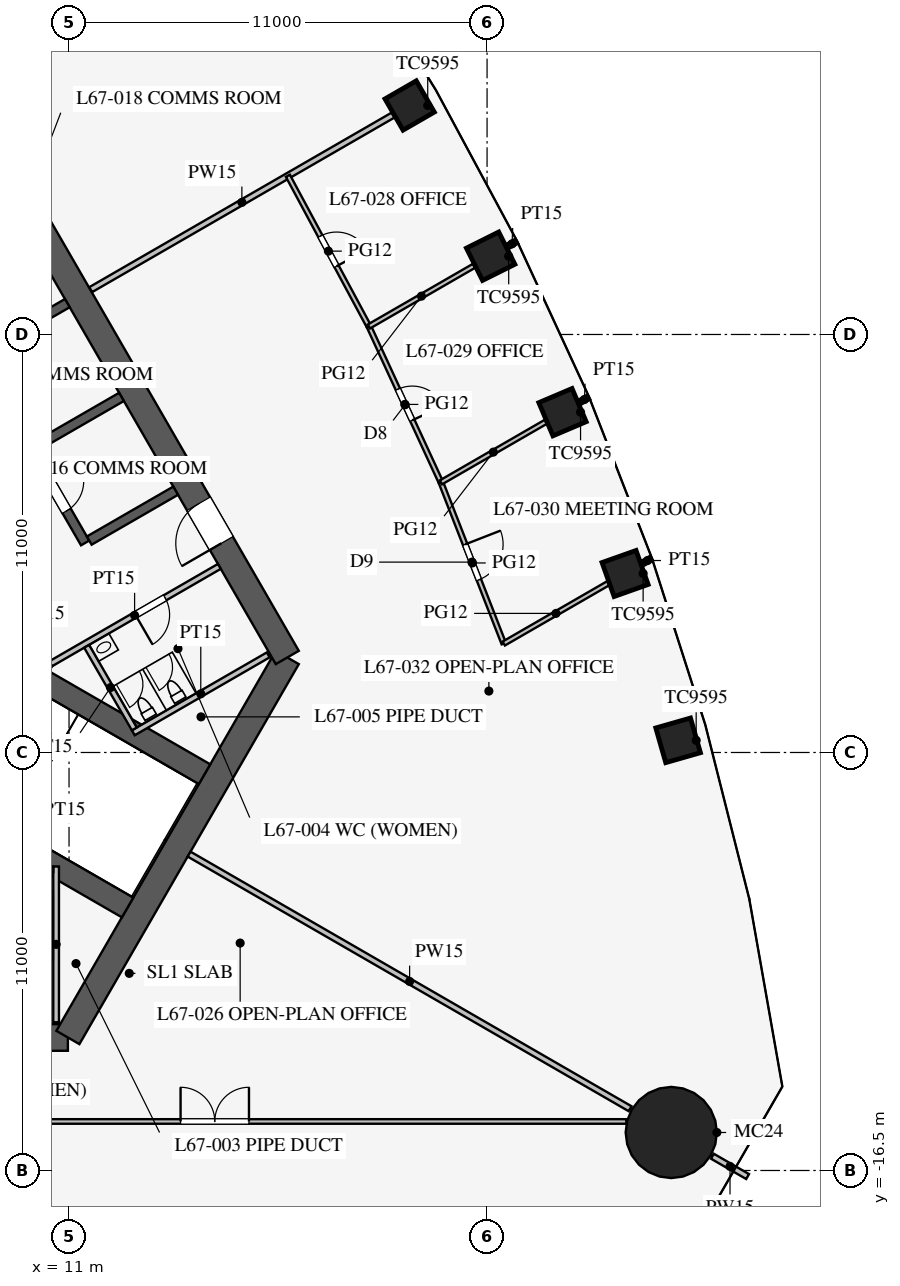
"""IFC4 building model, lengths in metres.
Left out: names, types, materials, properties, quantities, classifications, styles, units other than length and angle.
Written with IfcOpenShell. Run it as: python <this file> out.ifc"""

import sys

from ifc_helpers import new_model, si_unit, direction, frame, frame_2d, origin, origin_2d, place, context, subcontext, project, spatial, rectangle, circle, extrude, element, fill, save


model = new_model("IFC4")
c1 = context("Model", 3, precision=1e-05, world=origin(), true_north=direction((0.0, 1.0)))
c2 = subcontext(c1, "Body", "Model", "MODEL_VIEW")
j1 = project(units=[si_unit("LENGTHUNIT", "METRE"), si_unit("PLANEANGLEUNIT", "RADIAN")], contexts=[c1])
p1 = place(None, origin())
s1 = spatial("IfcSite", under=j1, at=p1, CompositionType="ELEMENT")
p2 = place(p1, origin())
s2 = spatial("IfcBuilding", under=s1, at=p2, CompositionType="ELEMENT")
p3 = place(p2, frame((0.0, 0.0, 293.1)))
s3 = spatial("IfcBuildingStorey", under=s2, at=p3, CompositionType="ELEMENT", Elevation=293.1)
for number, where, z_axis, x_axis in (
    (1, (27.027, -5.18, 0.0), (0.0, 0.0, 1.0), (-0.275, 0.961, 0.0)),
    (2, (25.632, -0.79, 0.0), (0.0, 0.0, 1.0), (-0.334, 0.942, 0.0)),
    (3, (23.985, 3.455, 0.0), (0.0, 0.0, 1.0), (-0.391, 0.92, 0.0)),
    (4, (22.094, 7.56, 0.0), (0.0, 0.0, 1.0), (-0.447, 0.895, 0.0)),
    (5, (19.963, 11.526, 0.0), (0.0, 0.0, 1.0), (-0.5, 0.866, 0.0)),
):
    element("IfcColumn", number, at=place(p3, frame(where, z_axis=z_axis, x_axis=x_axis)), inside=s3, PredefinedType="COLUMN", context=c2, shape_type="SweptSolid", body=[
        extrude(rectangle(XDim=0.95, YDim=0.95, at=origin_2d()), origin(), (0.0, 0.0, 1.0), 4.2),
    ])
p4 = place(p3, frame((26.847, -15.5, 0.0), z_axis=(0.0, 0.0, 1.0), x_axis=(1.0, 0.0, 0.0)))
e6 = element("IfcColumn", 6, at=p4, inside=s3, PredefinedType="COLUMN", context=c2, shape_type="SweptSolid", body=[
    extrude(circle(Radius=1.2, at=origin_2d()), origin(), (0.0, 0.0, 1.0), 4.2),
])
p5 = place(p3, frame((-10.97, -13.0, 0.0), z_axis=(0.0, 0.0, 1.0), x_axis=(1.0, 0.0, 0.0)))
e7 = element("IfcWall", 7, at=p5, inside=s3, PredefinedType="SHEAR", context=c2, shape_type="SweptSolid", body=[
    extrude(rectangle(XDim=21.939, YDim=0.7, at=frame_2d((10.97, 0.0))), origin(), (0.0, 0.0, 1.0), 4.2),
])
p6 = place(p5, frame((17.27, 0.0, 0.0)))
e8 = element("IfcOpeningElement", 8, at=p6, cuts=e7, PredefinedType="OPENING", context=c2, shape_type="SweptSolid", body=[
    extrude(rectangle(XDim=1.2, YDim=2.1, at=frame_2d((0.6, 1.05))), frame((0.0, 0.36, 0.0), z_axis=(0.0, -1.0, 0.0), x_axis=(1.0, 0.0, 0.0)), (0.0, 0.0, 1.0), 0.72),
])
p7 = place(p5, frame((3.47, 0.0, 0.0)))
e9 = element("IfcOpeningElement", 9, at=p7, cuts=e7, PredefinedType="OPENING", context=c2, shape_type="SweptSolid", body=[
    extrude(rectangle(XDim=1.2, YDim=2.1, at=frame_2d((0.6, 1.05))), frame((0.0, 0.36, 0.0), z_axis=(0.0, -1.0, 0.0), x_axis=(1.0, 0.0, 0.0)), (0.0, 0.0, 1.0), 0.72),
])
p8 = place(p3, frame((10.97, -13.0, 0.0), z_axis=(0.0, 0.0, 1.0), x_axis=(0.499995765644, 0.866027848477, 0.0)))
e10 = element("IfcWall", 10, at=p8, inside=s3, PredefinedType="SHEAR", context=c2, shape_type="SweptSolid", body=[
    extrude(rectangle(XDim=11.547, YDim=0.7, at=frame_2d((5.773, 0.0))), origin(), (0.0, 0.0, 1.0), 4.2),
])
p9 = place(p3, frame((16.743, -3.0, 0.0), z_axis=(0.0, 0.0, 1.0), x_axis=(-0.500002442456, 0.866023993627, 0.0)))
e11 = element("IfcWall", 11, at=p9, inside=s3, PredefinedType="SHEAR", context=c2, shape_type="SweptSolid", body=[
    extrude(rectangle(XDim=21.939, YDim=0.7, at=frame_2d((10.97, 0.0))), origin(), (0.0, 0.0, 1.0), 4.2),
])
p10 = place(p9, frame((17.27, 0.0, 0.0)))
e12 = element("IfcOpeningElement", 12, at=p10, cuts=e11, PredefinedType="OPENING", context=c2, shape_type="SweptSolid", body=[
    extrude(rectangle(XDim=1.2, YDim=2.1, at=frame_2d((0.6, 1.05))), frame((0.0, 0.36, 0.0), z_axis=(0.0, -1.0, 0.0), x_axis=(1.0, 0.0, 0.0)), (0.0, 0.0, 1.0), 0.72),
])
p11 = place(p9, frame((3.47, 0.0, 0.0)))
e13 = element("IfcOpeningElement", 13, at=p11, cuts=e11, PredefinedType="OPENING", context=c2, shape_type="SweptSolid", body=[
    extrude(rectangle(XDim=1.2, YDim=2.1, at=frame_2d((0.6, 1.05))), frame((0.0, 0.36, 0.0), z_axis=(0.0, -1.0, 0.0), x_axis=(1.0, 0.0, 0.0)), (0.0, 0.0, 1.0), 0.72),
])
p12 = place(p3, frame((11.424, 0.014, 0.0), z_axis=(0.0, 0.0, 1.0), x_axis=(-0.500001763848, 0.866024385424, 0.0)))
e14 = element("IfcWall", 14, at=p12, inside=s3, PredefinedType="SHEAR", context=c2, shape_type="SweptSolid", body=[
    extrude(rectangle(XDim=11.4, YDim=0.25, at=frame_2d((5.7, 0.0))), origin(), (0.0, 0.0, 1.0), 4.2),
])
p13 = place(p12, frame((0.975, 0.0, 0.0)))
e15 = element("IfcOpeningElement", 15, at=p13, cuts=e14, PredefinedType="OPENING", context=c2, shape_type="SweptSolid", body=[
    extrude(rectangle(XDim=0.9, YDim=2.1, at=frame_2d((0.45, 1.05))), frame((0.0, 0.135, 0.0), z_axis=(0.0, -1.0, 0.0), x_axis=(1.0, 0.0, 0.0)), (0.0, 0.0, 1.0), 0.27),
])
p14 = place(p12, frame((3.825, 0.0, 0.0)))
e16 = element("IfcOpeningElement", 16, at=p14, cuts=e14, PredefinedType="OPENING", context=c2, shape_type="SweptSolid", body=[
    extrude(rectangle(XDim=0.9, YDim=2.1, at=frame_2d((0.45, 1.05))), frame((0.0, 0.135, 0.0), z_axis=(0.0, -1.0, 0.0), x_axis=(1.0, 0.0, 0.0)), (0.0, 0.0, 1.0), 0.27),
])
p15 = place(p12, frame((6.675, 0.0, 0.0)))
e17 = element("IfcOpeningElement", 17, at=p15, cuts=e14, PredefinedType="OPENING", context=c2, shape_type="SweptSolid", body=[
    extrude(rectangle(XDim=0.9, YDim=2.1, at=frame_2d((0.45, 1.05))), frame((0.0, 0.135, 0.0), z_axis=(0.0, -1.0, 0.0), x_axis=(1.0, 0.0, 0.0)), (0.0, 0.0, 1.0), 0.27),
])
p16 = place(p12, frame((9.525, 0.0, 0.0)))
e18 = element("IfcOpeningElement", 18, at=p16, cuts=e14, PredefinedType="OPENING", context=c2, shape_type="SweptSolid", body=[
    extrude(rectangle(XDim=0.9, YDim=2.1, at=frame_2d((0.45, 1.05))), frame((0.0, 0.135, 0.0), z_axis=(0.0, -1.0, 0.0), x_axis=(1.0, 0.0, 0.0)), (0.0, 0.0, 1.0), 0.27),
])
for number, where, z_axis, x_axis in (
    (19, (11.532, 0.076, 0.0), (0.0, 0.0, 1.0), (0.866, 0.5, 0.0)),
    (20, (10.107, 2.544, 0.0), (0.0, 0.0, 1.0), (0.866, 0.5, 0.0)),
    (21, (8.682, 5.012, 0.0), (0.0, 0.0, 1.0), (0.866, 0.5, 0.0)),
):
    element("IfcWall", number, at=place(p3, frame(where, z_axis=z_axis, x_axis=x_axis)), inside=s3, PredefinedType="SHEAR", context=c2, shape_type="SweptSolid", body=[
        extrude(rectangle(XDim=2.625, YDim=0.25, at=frame_2d((1.312, 0.0))), origin(), (0.0, 0.0, 1.0), 4.2),
    ])
for number, where, z_axis, x_axis in (
    (22, (4.638, -5.016, 0.0), (0.0, 0.0, 1.0), (0.866, -0.5, 0.0)),
    (23, (6.663, -1.509, 0.0), (0.0, 0.0, 1.0), (0.866, -0.5, 0.0)),
):
    element("IfcWall", number, at=place(p3, frame(where, z_axis=z_axis, x_axis=x_axis)), inside=s3, PredefinedType="SHEAR", context=c2, shape_type="SweptSolid", body=[
        extrude(rectangle(XDim=9.125, YDim=0.6, at=frame_2d((4.562, 0.0))), origin(), (0.0, 0.0, 1.0), 4.2),
    ])
p17 = place(p3, frame((10.495, -3.178, 0.0), z_axis=(0.0, 0.0, 1.0), x_axis=(0.866037967349, 0.499978238636, 0.0)))
e24 = element("IfcWall", 24, at=p17, inside=s3, PredefinedType="PARTITIONING", context=c2, shape_type="SweptSolid", body=[
    extrude(rectangle(XDim=5.15, YDim=0.15, at=frame_2d((2.575, 0.0))), origin(), (0.0, 0.0, 1.0), 4.0),
])
p18 = place(p17, frame((2.6, 0.0, 0.0)))
e25 = element("IfcOpeningElement", 25, at=p18, cuts=e24, PredefinedType="OPENING", context=c2, shape_type="SweptSolid", body=[
    extrude(rectangle(XDim=0.9, YDim=2.1, at=frame_2d((0.45, 1.05))), frame((0.0, 0.085, 0.0), z_axis=(0.0, -1.0, 0.0), x_axis=(1.0, 0.0, 0.0)), (0.0, 0.0, 1.0), 0.17),
])
p19 = place(p3, frame((10.66, -8.5, 0.0), z_axis=(0.0, 0.0, 1.0), x_axis=(0.0, -1.0, 0.0)))
e26 = element("IfcWall", 26, at=p19, inside=s3, PredefinedType="PARTITIONING", context=c2, shape_type="SweptSolid", body=[
    extrude(rectangle(XDim=4.1, YDim=0.15, at=frame_2d((2.05, 0.0))), origin(), (0.0, 0.0, 1.0), 4.0),
])
p20 = place(p3, frame((8.075, -8.575, 0.0), z_axis=(0.0, 0.0, 1.0), x_axis=(1.0, 0.0, 0.0)))
e27 = element("IfcWall", 27, at=p20, inside=s3, PredefinedType="PARTITIONING", context=c2, shape_type="SweptSolid", body=[
    extrude(rectangle(XDim=2.51, YDim=0.15, at=frame_2d((1.255, 0.0))), origin(), (0.0, 0.0, 1.0), 4.0),
])
p21 = place(p3, frame((12.691, -4.982, 0.0), z_axis=(0.0, 0.0, 1.0), x_axis=(0.8660249478, 0.500000789788, 0.0)))
e28 = element("IfcWall", 28, at=p21, inside=s3, PredefinedType="PARTITIONING", context=c2, shape_type="SweptSolid", body=[
    extrude(rectangle(XDim=4.1, YDim=0.15, at=frame_2d((2.05, 0.0))), origin(), (0.0, 0.0, 1.0), 4.0),
])
p22 = place(p3, frame((11.464, -2.706, 0.0), z_axis=(0.0, 0.0, 1.0), x_axis=(0.50001992892, -0.866013897511, 0.0)))
e29 = element("IfcWall", 29, at=p22, inside=s3, PredefinedType="PARTITIONING", context=c2, shape_type="SweptSolid", body=[
    extrude(rectangle(XDim=2.51, YDim=0.15, at=frame_2d((1.255, 0.0))), origin(), (0.0, 0.0, 1.0), 4.0),
])
p23 = place(p3, frame((14.159, -8.175, 0.0), z_axis=(0.0, 0.0, 1.0), x_axis=(0.866026905467, -0.499997399001, 0.0)))
e30 = element("IfcWall", 30, at=p23, inside=s3, PredefinedType="PARTITIONING", context=c2, shape_type="SweptSolid", body=[
    extrude(rectangle(XDim=13.4, YDim=0.15, at=frame_2d((6.7, 0.0))), origin(), (0.0, 0.0, 1.0), 2.5),
])
p24 = place(p3, frame((27.929, -16.125, 0.0), z_axis=(0.0, 0.0, 1.0), x_axis=(0.866086810508, -0.499893625349, 0.0)))
e31 = element("IfcWall", 31, at=p24, inside=s3, PredefinedType="PARTITIONING", context=c2, shape_type="SweptSolid", body=[
    extrude(rectangle(XDim=1.07, YDim=0.15, at=frame_2d((0.535, 0.0))), origin(), (0.0, 0.0, 1.0), 2.5),
])
p25 = place(p3, frame((-25.665, -15.21, 0.0), z_axis=(0.0, 0.0, 1.0), x_axis=(1.0, 0.0, 0.0)))
e32 = element("IfcWall", 32, at=p25, inside=s3, PredefinedType="PARTITIONING", context=c2, shape_type="SweptSolid", body=[
    extrude(rectangle(XDim=51.33, YDim=0.12, at=frame_2d((25.665, 0.0))), origin(), (0.0, 0.0, 1.0), 2.9),
])
p26 = place(p25, frame((9.9, 0.0, 0.15)))
e33 = element("IfcOpeningElement", 33, at=p26, cuts=e32, PredefinedType="OPENING", context=c2, shape_type="SweptSolid", body=[
    extrude(rectangle(XDim=1.8, YDim=2.1, at=frame_2d((0.9, 1.05))), frame((0.0, 0.07, 0.0), z_axis=(0.0, -1.0, 0.0), x_axis=(1.0, 0.0, 0.0)), (0.0, 0.0, 1.0), 0.14),
])
p27 = place(p25, frame((39.6, 0.0, 0.15)))
e34 = element("IfcOpeningElement", 34, at=p27, cuts=e32, PredefinedType="OPENING", context=c2, shape_type="SweptSolid", body=[
    extrude(rectangle(XDim=1.8, YDim=2.1, at=frame_2d((0.9, 1.05))), frame((0.0, 0.07, 0.0), z_axis=(0.0, -1.0, 0.0), x_axis=(1.0, 0.0, 0.0)), (0.0, 0.0, 1.0), 0.14),
])
p28 = place(p3, frame((11.57, 6.68, 0.0), z_axis=(0.0, 0.0, 1.0), x_axis=(0.866026706704, 0.49999774327, 0.0)))
e35 = element("IfcWall", 35, at=p28, inside=s3, PredefinedType="PARTITIONING", context=c2, shape_type="SweptSolid", body=[
    extrude(rectangle(XDim=9.187, YDim=0.15, at=frame_2d((4.593, 0.0))), origin(), (0.0, 0.0, 1.0), 3.3),
])
p29 = place(p3, frame((26.115, -0.511, 0.0), z_axis=(0.0, 0.0, 1.0), x_axis=(0.866201770413, 0.499694399542, 0.0)))
e36 = element("IfcWall", 36, at=p29, inside=s3, PredefinedType="PARTITIONING", context=c2, shape_type="SweptSolid", body=[
    extrude(rectangle(XDim=0.251, YDim=0.15, at=frame_2d((0.125, 0.0))), origin(), (0.0, 0.0, 1.0), 2.9),
])
p30 = place(p3, frame((22.533, 7.813, 0.0), z_axis=(0.0, 0.0, 1.0), x_axis=(0.866003030001, 0.500038750527, 0.0)))
e37 = element("IfcWall", 37, at=p30, inside=s3, PredefinedType="PARTITIONING", context=c2, shape_type="SweptSolid", body=[
    extrude(rectangle(XDim=0.29, YDim=0.15, at=frame_2d((0.145, 0.0))), origin(), (0.0, 0.0, 1.0), 2.9),
])
p31 = place(p3, frame((24.447, 3.722, 0.0), z_axis=(0.0, 0.0, 1.0), x_axis=(0.866215944259, 0.499669828899, 0.0)))
e38 = element("IfcWall", 38, at=p31, inside=s3, PredefinedType="PARTITIONING", context=c2, shape_type="SweptSolid", body=[
    extrude(rectangle(XDim=0.268, YDim=0.15, at=frame_2d((0.134, 0.0))), origin(), (0.0, 0.0, 1.0), 2.9),
])
p32 = place(p3, frame((22.439, -2.633, 0.0), z_axis=(0.0, 0.0, 1.0), x_axis=(-0.363212149153, 0.931706463811, 0.0)))
e39 = element("IfcWall", 39, at=p32, inside=s3, PredefinedType="PARTITIONING", context=c2, shape_type="SweptSolid", body=[
    extrude(rectangle(XDim=4.553, YDim=0.12, at=frame_2d((2.276, 0.0))), origin(), (0.0, 0.0, 1.0), 2.9),
])
p33 = place(p32, frame((1.8, 0.0, 0.15)))
e40 = element("IfcOpeningElement", 40, at=p33, cuts=e39, PredefinedType="OPENING", context=c2, shape_type="SweptSolid", body=[
    extrude(rectangle(XDim=1.0, YDim=2.1, at=frame_2d((0.5, 1.05))), frame((0.0, 0.07, 0.0), z_axis=(0.0, -1.0, 0.0), x_axis=(1.0, 0.0, 0.0)), (0.0, 0.0, 1.0), 0.14),
])
p34 = place(p3, frame((18.891, 5.71, 0.0), z_axis=(0.0, 0.0, 1.0), x_axis=(-0.473524102582, 0.880780860529, 0.0)))
e41 = element("IfcWall", 41, at=p34, inside=s3, PredefinedType="PARTITIONING", context=c2, shape_type="SweptSolid", body=[
    extrude(rectangle(XDim=4.502, YDim=0.12, at=frame_2d((2.251, 0.0))), origin(), (0.0, 0.0, 1.0), 2.9),
])
p35 = place(p34, frame((1.8, 0.0, 0.15)))
e42 = element("IfcOpeningElement", 42, at=p35, cuts=e41, PredefinedType="OPENING", context=c2, shape_type="SweptSolid", body=[
    extrude(rectangle(XDim=0.9, YDim=2.1, at=frame_2d((0.45, 1.05))), frame((0.0, 0.07, 0.0), z_axis=(0.0, -1.0, 0.0), x_axis=(1.0, 0.0, 0.0)), (0.0, 0.0, 1.0), 0.14),
])
p36 = place(p3, frame((20.786, 1.608, 0.0), z_axis=(0.0, 0.0, 1.0), x_axis=(-0.419335693458, 0.907831248742, 0.0)))
e43 = element("IfcWall", 43, at=p36, inside=s3, PredefinedType="PARTITIONING", context=c2, shape_type="SweptSolid", body=[
    extrude(rectangle(XDim=4.519, YDim=0.12, at=frame_2d((2.259, 0.0))), origin(), (0.0, 0.0, 1.0), 2.9),
])
p37 = place(p36, frame((1.8, 0.0, 0.15)))
e44 = element("IfcOpeningElement", 44, at=p37, cuts=e43, PredefinedType="OPENING", context=c2, shape_type="SweptSolid", body=[
    extrude(rectangle(XDim=0.9, YDim=2.1, at=frame_2d((0.45, 1.05))), frame((0.0, 0.07, 0.0), z_axis=(0.0, -1.0, 0.0), x_axis=(1.0, 0.0, 0.0)), (0.0, 0.0, 1.0), 0.14),
])
p38 = place(p3, frame((22.439, -2.633, 0.0), z_axis=(0.0, 0.0, 1.0), x_axis=(0.86599465956, 0.500053246778, 0.0)))
e45 = element("IfcWall", 45, at=p38, inside=s3, PredefinedType="PARTITIONING", context=c2, shape_type="SweptSolid", body=[
    extrude(rectangle(XDim=3.173, YDim=0.12, at=frame_2d((1.586, 0.0))), origin(), (0.0, 0.0, 1.0), 2.9),
])
p39 = place(p3, frame((18.891, 5.71, 0.0), z_axis=(0.0, 0.0, 1.0), x_axis=(0.866008575759, 0.500029145862, 0.0)))
e46 = element("IfcWall", 46, at=p39, inside=s3, PredefinedType="PARTITIONING", context=c2, shape_type="SweptSolid", body=[
    extrude(rectangle(XDim=3.193, YDim=0.12, at=frame_2d((1.596, 0.0))), origin(), (0.0, 0.0, 1.0), 2.9),
])
p40 = place(p3, frame((20.786, 1.608, 0.0), z_axis=(0.0, 0.0, 1.0), x_axis=(0.866060515081, 0.499939180519, 0.0)))
e47 = element("IfcWall", 47, at=p40, inside=s3, PredefinedType="PARTITIONING", context=c2, shape_type="SweptSolid", body=[
    extrude(rectangle(XDim=3.186, YDim=0.12, at=frame_2d((1.593, 0.0))), origin(), (0.0, 0.0, 1.0), 2.9),
])
p41 = place(p18, frame((0.9, 0.0, 0.0), z_axis=(0.0, 0.0, 1.0), x_axis=(-1.0, 0.0, 0.0)))
e48 = element("IfcDoor", 48, at=p41, inside=s3, OperationType="SINGLE_SWING_RIGHT", PredefinedType="DOOR", context=c2, shape_type="SweptSolid", body=[
    extrude(rectangle(XDim=0.9, YDim=2.1, at=frame_2d((0.45, 1.05))), frame((0.0, 0.025, 0.0), z_axis=(0.0, -1.0, 0.0), x_axis=(1.0, 0.0, 0.0)), (0.0, 0.0, 1.0), 0.05),
])
fill(e25, e48)
p42 = place(p11, origin())
e49 = element("IfcDoor", 49, at=p42, inside=s3, OperationType="SINGLE_SWING_LEFT", PredefinedType="DOOR", context=c2, shape_type="SweptSolid", body=[
    extrude(rectangle(XDim=1.2, YDim=2.1, at=frame_2d((0.6, 1.05))), frame((0.0, 0.025, 0.0), z_axis=(0.0, -1.0, 0.0), x_axis=(1.0, 0.0, 0.0)), (0.0, 0.0, 1.0), 0.05),
])
fill(e13, e49)
p43 = place(p13, frame((0.9, 0.0, 0.0), z_axis=(0.0, 0.0, 1.0), x_axis=(-1.0, 0.0, 0.0)))
e50 = element("IfcDoor", 50, at=p43, inside=s3, OperationType="SINGLE_SWING_LEFT", PredefinedType="DOOR", context=c2, shape_type="SweptSolid", body=[
    extrude(rectangle(XDim=0.9, YDim=2.1, at=frame_2d((0.45, 1.05))), frame((0.0, 0.025, 0.0), z_axis=(0.0, -1.0, 0.0), x_axis=(1.0, 0.0, 0.0)), (0.0, 0.0, 1.0), 0.05),
])
fill(e15, e50)
p44 = place(p27, origin())
e51 = element("IfcDoor", 51, at=p44, inside=s3, OperationType="DOUBLE_DOOR_SINGLE_SWING", PredefinedType="DOOR", context=c2, shape_type="SweptSolid", body=[
    extrude(rectangle(XDim=1.8, YDim=2.1, at=frame_2d((0.9, 1.05))), frame((0.0, 0.025, 0.0), z_axis=(0.0, -1.0, 0.0), x_axis=(1.0, 0.0, 0.0)), (0.0, 0.0, 1.0), 0.05),
])
fill(e34, e51)
p45 = place(p35, frame((0.9, 0.0, 0.0), z_axis=(0.0, 0.0, 1.0), x_axis=(-1.0, 0.0, 0.0)))
e52 = element("IfcDoor", 52, at=p45, inside=s3, OperationType="SINGLE_SWING_RIGHT", PredefinedType="DOOR", context=c2, shape_type="SweptSolid", body=[
    extrude(rectangle(XDim=0.9, YDim=2.1, at=frame_2d((0.45, 1.05))), frame((0.0, 0.025, 0.0), z_axis=(0.0, -1.0, 0.0), x_axis=(1.0, 0.0, 0.0)), (0.0, 0.0, 1.0), 0.05),
])
fill(e42, e52)
p46 = place(p37, frame((0.9, 0.0, 0.0), z_axis=(0.0, 0.0, 1.0), x_axis=(-1.0, 0.0, 0.0)))
e53 = element("IfcDoor", 53, at=p46, inside=s3, OperationType="SINGLE_SWING_RIGHT", PredefinedType="DOOR", context=c2, shape_type="SweptSolid", body=[
    extrude(rectangle(XDim=0.9, YDim=2.1, at=frame_2d((0.45, 1.05))), frame((0.0, 0.025, 0.0), z_axis=(0.0, -1.0, 0.0), x_axis=(1.0, 0.0, 0.0)), (0.0, 0.0, 1.0), 0.05),
])
fill(e44, e53)
p47 = place(p33, frame((1.0, 0.0, 0.0), z_axis=(0.0, 0.0, 1.0), x_axis=(-1.0, 0.0, 0.0)))
e54 = element("IfcDoor", 54, at=p47, inside=s3, OperationType="SINGLE_SWING_LEFT", PredefinedType="DOOR", context=c2, shape_type="SweptSolid", body=[
    extrude(rectangle(XDim=1.0, YDim=2.1, at=frame_2d((0.5, 1.05))), frame((0.0, 0.025, 0.0), z_axis=(0.0, -1.0, 0.0), x_axis=(1.0, 0.0, 0.0)), (0.0, 0.0, 1.0), 0.05),
])
fill(e40, e54)
save(model, sys.argv[1])
